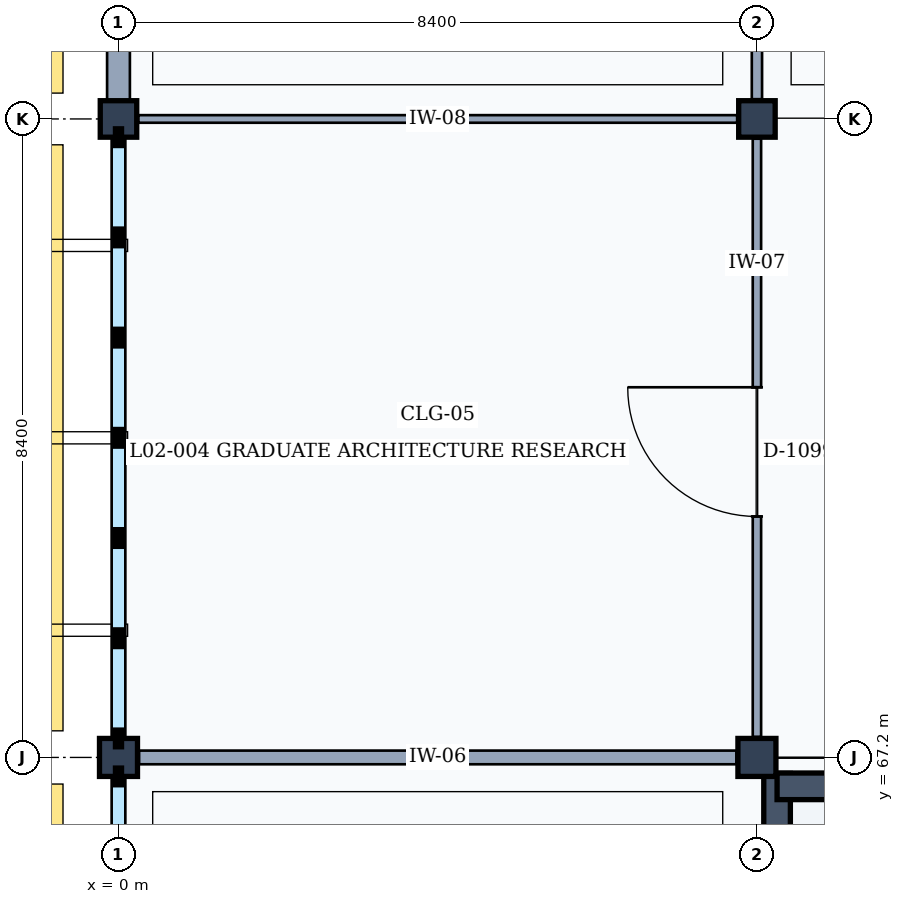
"""IFC4 building model, lengths in metres.
Left out: names, types, materials, properties, quantities, classifications, styles, units other than length and angle.
Written with IfcOpenShell. Run it as: python <this file> out.ifc"""

import sys

from ifc_helpers import new_model, si_unit, direction, frame, frame_2d, origin, origin_2d, place, context, subcontext, project, spatial, rectangle, extrude, element, fill, save


model = new_model("IFC4")
c1 = context("Model", 3, precision=1e-05, world=origin(), true_north=direction((0.0, 1.0)))
c2 = subcontext(c1, "Body", "Model", "MODEL_VIEW")
j1 = project(units=[si_unit("LENGTHUNIT", "METRE"), si_unit("PLANEANGLEUNIT", "RADIAN")], contexts=[c1])
p1 = place(None, origin())
s1 = spatial("IfcSite", under=j1, at=p1, CompositionType="ELEMENT")
p2 = place(p1, origin())
s2 = spatial("IfcBuilding", under=s1, at=p2, CompositionType="ELEMENT")
p3 = place(p2, frame((0.0, 0.0, 9.6)))
s3 = spatial("IfcBuildingStorey", under=s2, at=p3, CompositionType="ELEMENT", Elevation=9.6)
p4 = place(p3, frame((0.0, 67.2, 0.0), z_axis=(0.0, 0.0, 1.0), x_axis=(1.0, 0.0, 0.0)))
e1 = element("IfcColumn", 1, at=p4, inside=s3, PredefinedType="COLUMN", context=c2, shape_type="SweptSolid", body=[
    extrude(rectangle(XDim=0.5, YDim=0.5, at=origin_2d()), origin(), (0.0, 0.0, 1.0), 4.2),
])
p5 = place(p3, frame((0.0, 75.6, 0.0), z_axis=(0.0, 0.0, 1.0), x_axis=(1.0, 0.0, 0.0)))
e2 = element("IfcColumn", 2, at=p5, inside=s3, PredefinedType="COLUMN", context=c2, shape_type="SweptSolid", body=[
    extrude(rectangle(XDim=0.48, YDim=0.48, at=origin_2d()), origin(), (0.0, 0.0, 1.0), 4.2),
])
p6 = place(p3, frame((8.4, 67.2, 0.0), z_axis=(0.0, 0.0, 1.0), x_axis=(1.0, 0.0, 0.0)))
e3 = element("IfcColumn", 3, at=p6, inside=s3, PredefinedType="COLUMN", context=c2, shape_type="SweptSolid", body=[
    extrude(rectangle(XDim=0.5, YDim=0.5, at=origin_2d()), origin(), (0.0, 0.0, 1.0), 4.2),
])
p7 = place(p3, frame((8.4, 75.6, 0.0), z_axis=(0.0, 0.0, 1.0), x_axis=(1.0, 0.0, 0.0)))
e4 = element("IfcColumn", 4, at=p7, inside=s3, PredefinedType="COLUMN", context=c2, shape_type="SweptSolid", body=[
    extrude(rectangle(XDim=0.48, YDim=0.48, at=origin_2d()), origin(), (0.0, 0.0, 1.0), 4.2),
])
p8 = place(p3, frame((0.0, 75.84, 0.0), z_axis=(0.0, 0.0, 1.0), x_axis=(0.0, 1.0, 0.0)))
e5 = element("IfcWall", 5, at=p8, inside=s3, PredefinedType="SOLIDWALL", context=c2, shape_type="SweptSolid", body=[
    extrude(rectangle(XDim=7.91, YDim=0.3, at=frame_2d((3.955, 0.0))), origin(), (0.0, 0.0, 1.0), 3.36),
])
p9 = place(p8, frame((2.555, 0.0, 0.9)))
e6 = element("IfcOpeningElement", 6, at=p9, cuts=e5, PredefinedType="OPENING", context=c2, shape_type="SweptSolid", body=[
    extrude(rectangle(XDim=2.8, YDim=1.65, at=frame_2d((1.4, 0.825))), frame((0.0, 0.16, 0.0), z_axis=(0.0, -1.0, 0.0), x_axis=(1.0, 0.0, 0.0)), (0.0, 0.0, 1.0), 0.32),
])
p10 = place(p3, frame((8.665, 59.05, 0.0), z_axis=(0.0, 0.0, 1.0), x_axis=(0.0, 1.0, 0.0)))
e7 = element("IfcWall", 7, at=p10, inside=s3, PredefinedType="SHEAR", context=c2, shape_type="SweptSolid", body=[
    extrude(rectangle(XDim=7.94, YDim=0.35, at=frame_2d((3.97, 0.0))), origin(), (0.0, 0.0, 1.0), 3.96),
])
p11 = place(p3, frame((8.665, 66.82, 0.0), z_axis=(0.0, 0.0, 1.0), x_axis=(1.0, 0.0, 0.0)))
e8 = element("IfcWall", 8, at=p11, inside=s3, PredefinedType="SHEAR", context=c2, shape_type="SweptSolid", body=[
    extrude(rectangle(XDim=7.875, YDim=0.35, at=frame_2d((3.938, 0.0))), origin(), (0.0, 0.0, 1.0), 3.96),
])
p12 = place(p3, frame((0.27, 67.2, 0.0), z_axis=(0.0, 0.0, 1.0), x_axis=(1.0, 0.0, 0.0)))
e9 = element("IfcWall", 9, at=p12, inside=s3, PredefinedType="PARTITIONING", context=c2, shape_type="SweptSolid", body=[
    extrude(rectangle(XDim=7.86, YDim=0.18, at=frame_2d((3.93, 0.0))), origin(), (0.0, 0.0, 1.0), 3.32),
])
p13 = place(p3, frame((8.4, 67.47, 0.0), z_axis=(0.0, 0.0, 1.0), x_axis=(0.0, 1.0, 0.0)))
e10 = element("IfcWall", 10, at=p13, inside=s3, PredefinedType="PARTITIONING", context=c2, shape_type="SweptSolid", body=[
    extrude(rectangle(XDim=7.87, YDim=0.11, at=frame_2d((3.935, 0.0))), origin(), (0.0, 0.0, 1.0), 3.32),
])
p14 = place(p13, frame((2.9, 0.0, 0.0)))
e11 = element("IfcOpeningElement", 11, at=p14, cuts=e10, PredefinedType="OPENING", context=c2, shape_type="SweptSolid", body=[
    extrude(rectangle(XDim=1.7, YDim=2.3, at=frame_2d((0.85, 1.15))), frame((0.0, 0.065, 0.0), z_axis=(0.0, -1.0, 0.0), x_axis=(1.0, 0.0, 0.0)), (0.0, 0.0, 1.0), 0.13),
])
p15 = place(p3, frame((0.26, 75.6, 0.0), z_axis=(0.0, 0.0, 1.0), x_axis=(1.0, 0.0, 0.0)))
e12 = element("IfcWall", 12, at=p15, inside=s3, PredefinedType="MOVABLE", context=c2, shape_type="SweptSolid", body=[
    extrude(rectangle(XDim=7.88, YDim=0.1, at=frame_2d((3.94, 0.0))), origin(), (0.0, 0.0, 1.0), 3.32),
])
p16 = place(p3, frame((8.4, 75.86, 0.0), z_axis=(0.0, 0.0, 1.0), x_axis=(0.0, 1.0, 0.0)))
e13 = element("IfcWall", 13, at=p16, inside=s3, PredefinedType="PARTITIONING", context=c2, shape_type="SweptSolid", body=[
    extrude(rectangle(XDim=7.87, YDim=0.135, at=frame_2d((3.935, 0.0))), origin(), (0.0, 0.0, 1.0), 3.32),
])
p17 = place(p16, frame((2.8, 0.0, 0.0)))
e14 = element("IfcOpeningElement", 14, at=p17, cuts=e13, PredefinedType="OPENING", context=c2, shape_type="SweptSolid", body=[
    extrude(rectangle(XDim=1.9, YDim=2.4, at=frame_2d((0.95, 1.2))), frame((0.0, 0.077, 0.0), z_axis=(0.0, -1.0, 0.0), x_axis=(1.0, 0.0, 0.0)), (0.0, 0.0, 1.0), 0.155),
])
p18 = place(p14, origin())
e15 = element("IfcDoor", 15, at=p18, inside=s3, OperationType="SINGLE_SWING_RIGHT", PredefinedType="DOOR", context=c2, shape_type="SweptSolid", body=[
    extrude(rectangle(XDim=1.7, YDim=2.3, at=frame_2d((0.85, 1.15))), frame((0.0, 0.025, 0.0), z_axis=(0.0, -1.0, 0.0), x_axis=(1.0, 0.0, 0.0)), (0.0, 0.0, 1.0), 0.05),
])
fill(e11, e15)
save(model, sys.argv[1])
